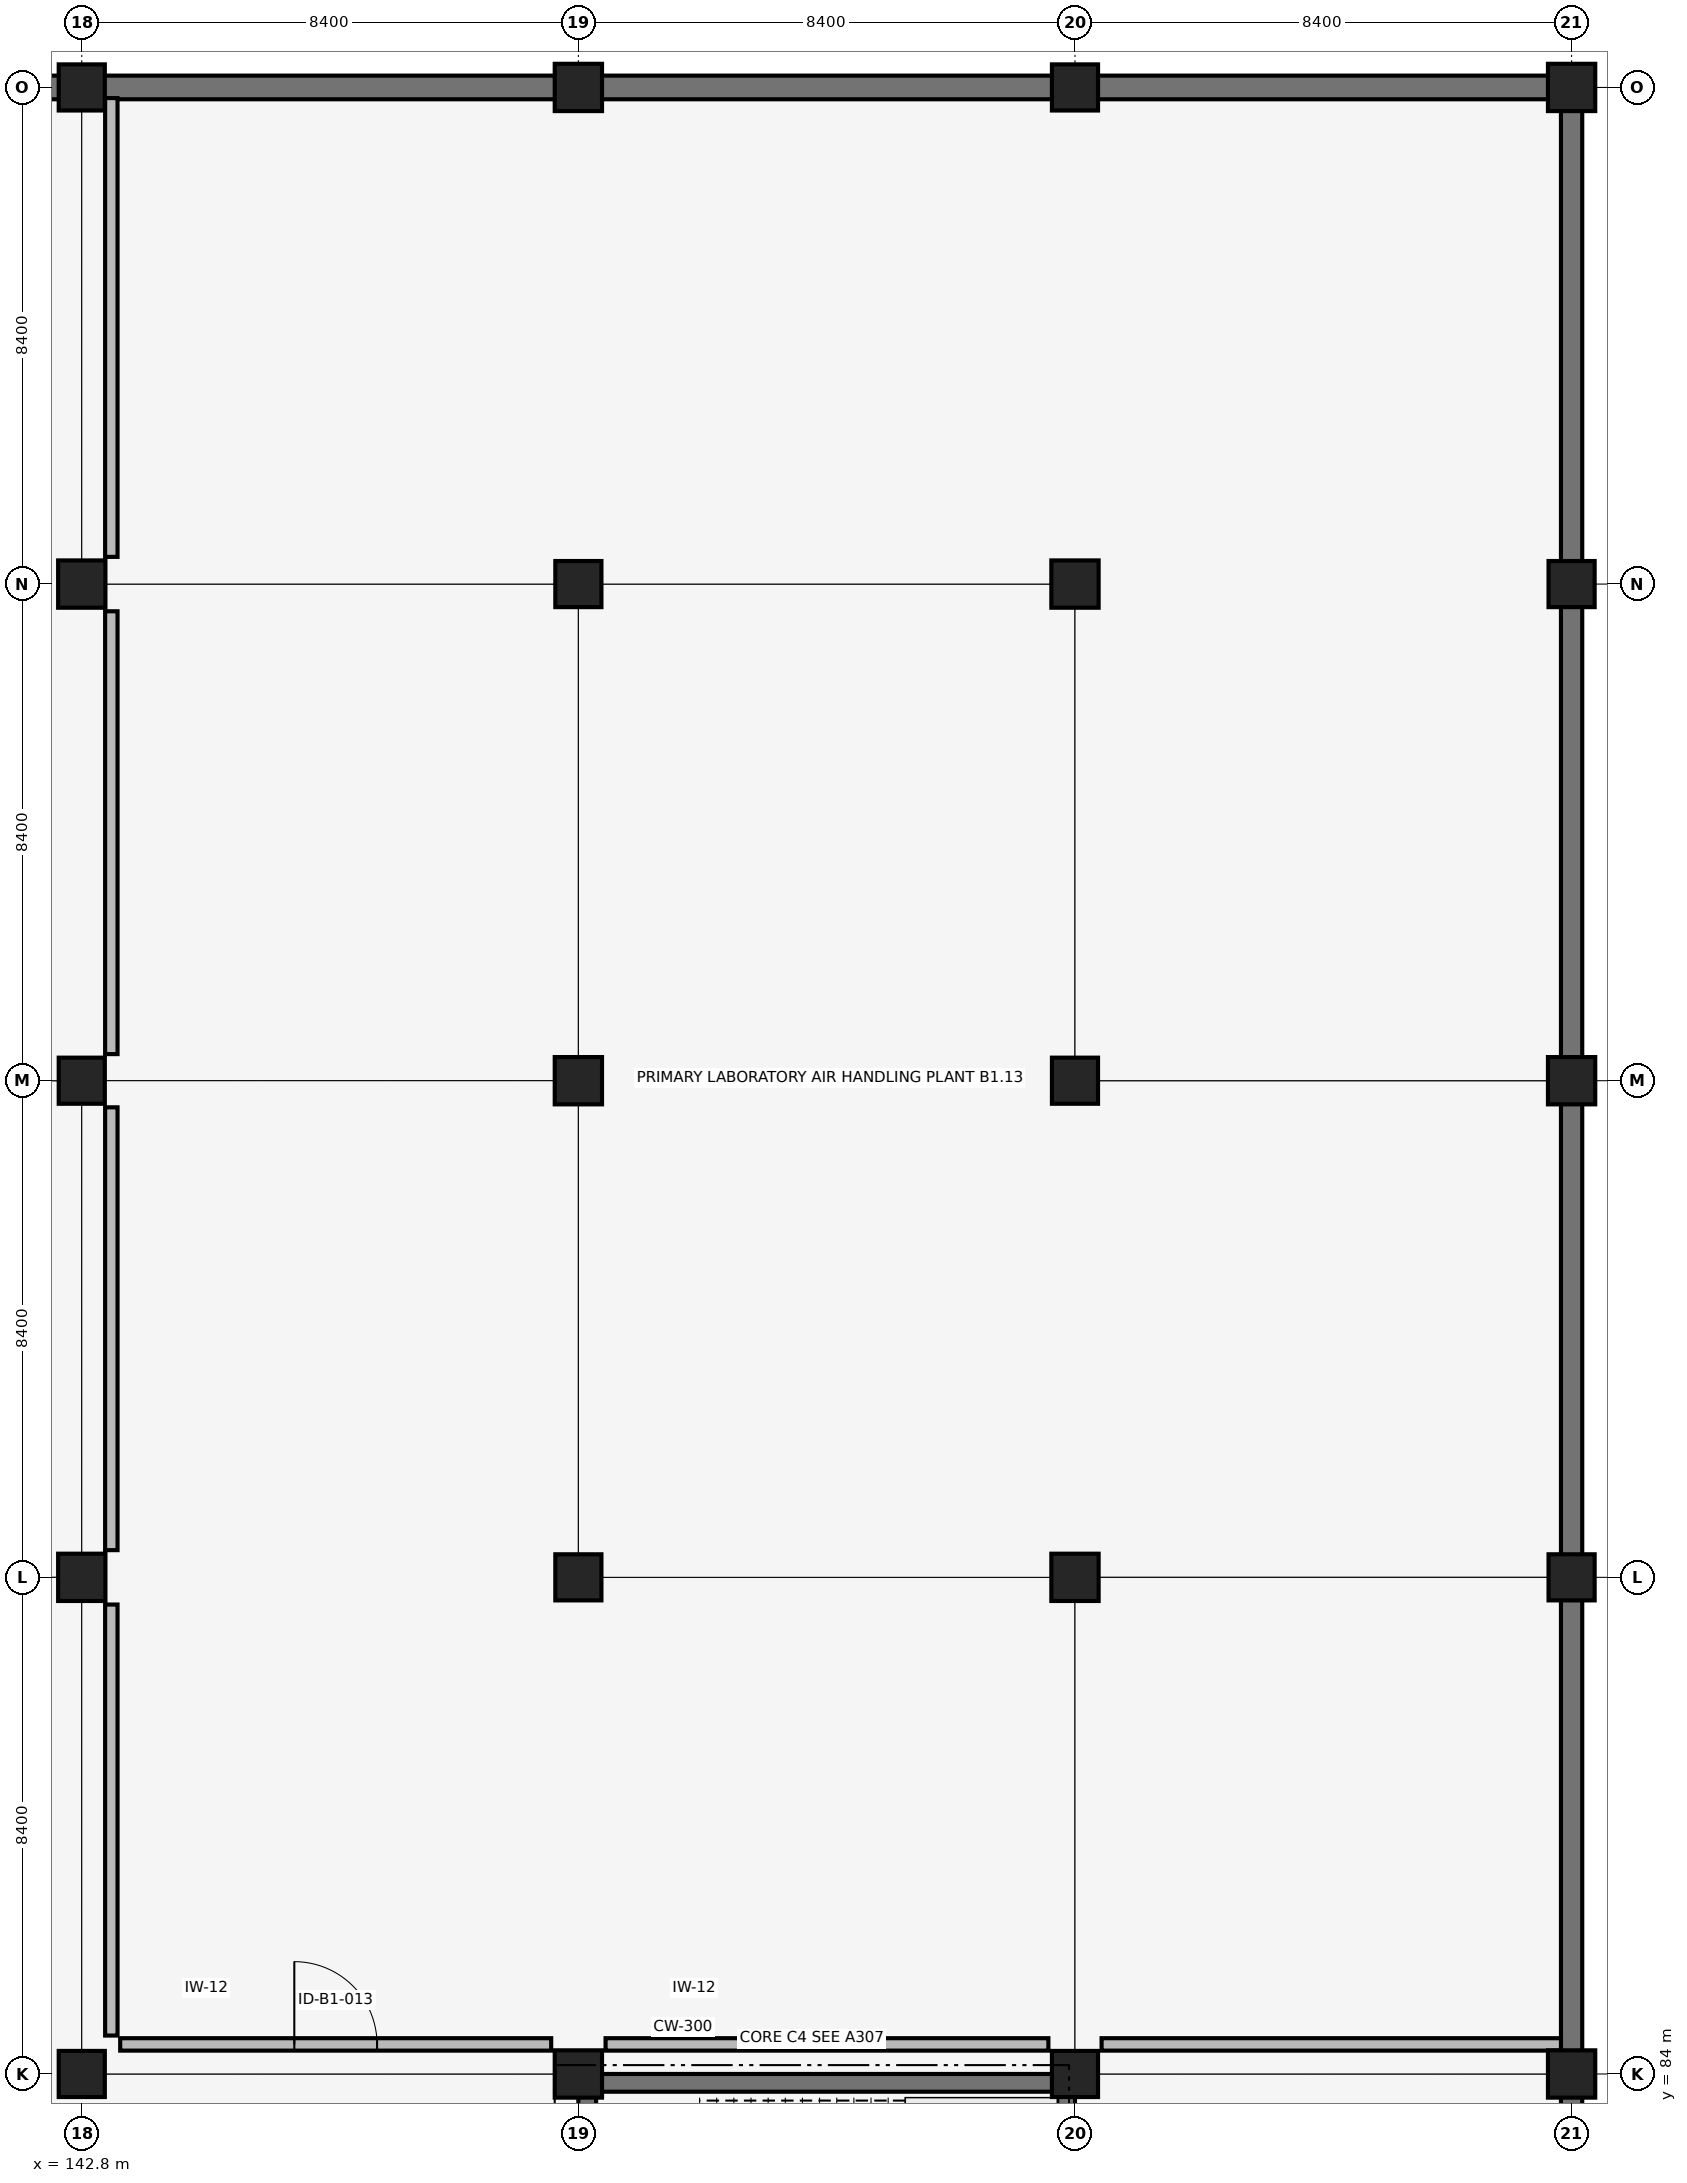
"""IFC4 building model, lengths in metres.
Left out: names, types, materials, properties, quantities, classifications, styles, units other than length and angle.
Written with IfcOpenShell. Run it as: python <this file> out.ifc"""

import sys

from ifc_helpers import new_model, si_unit, direction, frame, frame_2d, origin, origin_2d, place, context, subcontext, project, spatial, rectangle, extrude, element, fill, save


model = new_model("IFC4")
c1 = context("Model", 3, precision=1e-05, world=origin(), true_north=direction((0.0, 1.0)))
c2 = subcontext(c1, "Body", "Model", "MODEL_VIEW")
j1 = project(units=[si_unit("LENGTHUNIT", "METRE"), si_unit("PLANEANGLEUNIT", "RADIAN")], contexts=[c1])
p1 = place(None, origin())
s1 = spatial("IfcSite", under=j1, at=p1, CompositionType="ELEMENT")
p2 = place(p1, origin())
s2 = spatial("IfcBuilding", under=s1, at=p2, CompositionType="ELEMENT")
p3 = place(p2, frame((0.0, 0.0, -4.42)))
s3 = spatial("IfcBuildingStorey", under=s2, at=p3, CompositionType="ELEMENT", Elevation=-4.42)
p4 = place(p3, frame((134.75, 117.6, 0.0), z_axis=(0.0, 0.0, 1.0), x_axis=(1.0, 0.0, 0.0)))
e1 = element("IfcWall", 1, at=p4, inside=s3, PredefinedType="USERDEFINED", context=c2, shape_type="SweptSolid", body=[
    extrude(rectangle(XDim=7.7, YDim=0.4, at=frame_2d((3.85, 0.0))), origin(), (0.0, 0.0, 1.0), 4.12),
])
p5 = place(p3, frame((143.15, 117.6, 0.0), z_axis=(0.0, 0.0, 1.0), x_axis=(1.0, 0.0, 0.0)))
e2 = element("IfcWall", 2, at=p5, inside=s3, PredefinedType="USERDEFINED", context=c2, shape_type="SweptSolid", body=[
    extrude(rectangle(XDim=7.7, YDim=0.4, at=frame_2d((3.85, 0.0))), origin(), (0.0, 0.0, 1.0), 4.12),
])
p6 = place(p3, frame((151.55, 117.6, 0.0), z_axis=(0.0, 0.0, 1.0), x_axis=(1.0, 0.0, 0.0)))
e3 = element("IfcWall", 3, at=p6, inside=s3, PredefinedType="USERDEFINED", context=c2, shape_type="SweptSolid", body=[
    extrude(rectangle(XDim=7.7, YDim=0.4, at=frame_2d((3.85, 0.0))), origin(), (0.0, 0.0, 1.0), 4.12),
])
for number, where, z_axis, x_axis in (
    (4, (168.0, 75.95, 0.0), (0.0, 0.0, 1.0), (0.0, 1.0, 0.0)),
    (5, (168.0, 84.35, 0.0), (0.0, 0.0, 1.0), (0.0, 1.0, 0.0)),
    (6, (168.0, 92.75, 0.0), (0.0, 0.0, 1.0), (0.0, 1.0, 0.0)),
):
    element("IfcWall", number, at=place(p3, frame(where, z_axis=z_axis, x_axis=x_axis)), inside=s3, PredefinedType="USERDEFINED", context=c2, shape_type="SweptSolid", body=[
        extrude(rectangle(XDim=7.7, YDim=0.36, at=frame_2d((3.85, 0.0))), origin(), (0.0, 0.0, 1.0), 4.12),
    ])
p7 = place(p3, frame((168.0, 101.15, 0.0), z_axis=(0.0, 0.0, 1.0), x_axis=(0.0, 1.0, 0.0)))
e7 = element("IfcWall", 7, at=p7, inside=s3, PredefinedType="USERDEFINED", context=c2, shape_type="SweptSolid", body=[
    extrude(rectangle(XDim=7.7, YDim=0.36, at=frame_2d((3.85, 0.0))), origin(), (0.0, 0.0, 1.0), 4.12),
])
p8 = place(p3, frame((159.95, 117.6, 0.0), z_axis=(0.0, 0.0, 1.0), x_axis=(1.0, 0.0, 0.0)))
e8 = element("IfcWall", 8, at=p8, inside=s3, PredefinedType="USERDEFINED", context=c2, shape_type="SweptSolid", body=[
    extrude(rectangle(XDim=7.7, YDim=0.4, at=frame_2d((3.85, 0.0))), origin(), (0.0, 0.0, 1.0), 4.12),
])
p9 = place(p3, frame((168.0, 109.55, 0.0), z_axis=(0.0, 0.0, 1.0), x_axis=(0.0, 1.0, 0.0)))
e9 = element("IfcWall", 9, at=p9, inside=s3, PredefinedType="USERDEFINED", context=c2, shape_type="SweptSolid", body=[
    extrude(rectangle(XDim=7.7, YDim=0.36, at=frame_2d((3.85, 0.0))), origin(), (0.0, 0.0, 1.0), 4.12),
])
p10 = place(p3, frame((151.35, 83.85, 0.0), z_axis=(0.0, 0.0, 1.0), x_axis=(1.0, 0.0, 0.0)))
e10 = element("IfcWall", 10, at=p10, inside=s3, PredefinedType="SHEAR", context=c2, shape_type="SweptSolid", body=[
    extrude(rectangle(XDim=8.1, YDim=0.3, at=frame_2d((4.05, 0.0))), origin(), (0.0, 0.0, 1.0), 4.12),
])
p11 = place(p3, frame((151.35, 75.75, 0.0), z_axis=(0.0, 0.0, 1.0), x_axis=(0.0, 1.0, 0.0)))
e11 = element("IfcWall", 11, at=p11, inside=s3, PredefinedType="SHEAR", context=c2, shape_type="SweptSolid", body=[
    extrude(rectangle(XDim=8.1, YDim=0.3, at=frame_2d((4.05, 0.0))), origin(), (0.0, 0.0, 1.0), 4.12),
])
p12 = place(p11, frame((1.325, 0.0, 0.0)))
e12 = element("IfcOpeningElement", 12, at=p12, cuts=e11, PredefinedType="OPENING", context=c2, shape_type="SweptSolid", body=[
    extrude(rectangle(XDim=1.45, YDim=2.15, at=frame_2d((0.725, 1.075))), frame((0.0, 0.16, 0.0), z_axis=(0.0, -1.0, 0.0), x_axis=(1.0, 0.0, 0.0)), (0.0, 0.0, 1.0), 0.32),
])
p13 = place(p3, frame((159.45, 75.75, 0.0), z_axis=(0.0, 0.0, 1.0), x_axis=(0.0, 1.0, 0.0)))
e13 = element("IfcWall", 13, at=p13, inside=s3, PredefinedType="SHEAR", context=c2, shape_type="SweptSolid", body=[
    extrude(rectangle(XDim=8.1, YDim=0.3, at=frame_2d((4.05, 0.0))), origin(), (0.0, 0.0, 1.0), 4.12),
])
p14 = place(p3, frame((142.8, 84.0, -0.4), z_axis=(0.0, 0.0, 1.0), x_axis=(1.0, 0.0, 0.0)))
e14 = element("IfcColumn", 14, at=p14, inside=s3, PredefinedType="COLUMN", context=c2, shape_type="SweptSolid", body=[
    extrude(rectangle(XDim=0.78, YDim=0.78, at=origin_2d()), origin(), (0.0, 0.0, 1.0), 4.52),
])
p15 = place(p3, frame((142.8, 92.4, -0.4), z_axis=(0.0, 0.0, 1.0), x_axis=(1.0, 0.0, 0.0)))
e15 = element("IfcColumn", 15, at=p15, inside=s3, PredefinedType="COLUMN", context=c2, shape_type="SweptSolid", body=[
    extrude(rectangle(XDim=0.8, YDim=0.8, at=origin_2d()), origin(), (0.0, 0.0, 1.0), 4.52),
])
p16 = place(p3, frame((142.8, 100.8, -0.4), z_axis=(0.0, 0.0, 1.0), x_axis=(1.0, 0.0, 0.0)))
e16 = element("IfcColumn", 16, at=p16, inside=s3, PredefinedType="COLUMN", context=c2, shape_type="SweptSolid", body=[
    extrude(rectangle(XDim=0.78, YDim=0.78, at=origin_2d()), origin(), (0.0, 0.0, 1.0), 4.52),
])
p17 = place(p3, frame((142.8, 109.2, -0.4), z_axis=(0.0, 0.0, 1.0), x_axis=(1.0, 0.0, 0.0)))
e17 = element("IfcColumn", 17, at=p17, inside=s3, PredefinedType="COLUMN", context=c2, shape_type="SweptSolid", body=[
    extrude(rectangle(XDim=0.8, YDim=0.8, at=origin_2d()), origin(), (0.0, 0.0, 1.0), 4.52),
])
p18 = place(p3, frame((142.8, 117.6, -0.4), z_axis=(0.0, 0.0, 1.0), x_axis=(1.0, 0.0, 0.0)))
e18 = element("IfcColumn", 18, at=p18, inside=s3, PredefinedType="COLUMN", context=c2, shape_type="SweptSolid", body=[
    extrude(rectangle(XDim=0.78, YDim=0.78, at=origin_2d()), origin(), (0.0, 0.0, 1.0), 4.52),
])
p19 = place(p3, frame((151.2, 84.0, -0.4), z_axis=(0.0, 0.0, 1.0), x_axis=(1.0, 0.0, 0.0)))
e19 = element("IfcColumn", 19, at=p19, inside=s3, PredefinedType="COLUMN", context=c2, shape_type="SweptSolid", body=[
    extrude(rectangle(XDim=0.8, YDim=0.8, at=origin_2d()), origin(), (0.0, 0.0, 1.0), 4.52),
])
p20 = place(p3, frame((151.2, 92.4, -0.4), z_axis=(0.0, 0.0, 1.0), x_axis=(1.0, 0.0, 0.0)))
e20 = element("IfcColumn", 20, at=p20, inside=s3, PredefinedType="COLUMN", context=c2, shape_type="SweptSolid", body=[
    extrude(rectangle(XDim=0.78, YDim=0.78, at=origin_2d()), origin(), (0.0, 0.0, 1.0), 4.52),
])
p21 = place(p3, frame((151.2, 100.8, -0.4), z_axis=(0.0, 0.0, 1.0), x_axis=(1.0, 0.0, 0.0)))
e21 = element("IfcColumn", 21, at=p21, inside=s3, PredefinedType="COLUMN", context=c2, shape_type="SweptSolid", body=[
    extrude(rectangle(XDim=0.8, YDim=0.8, at=origin_2d()), origin(), (0.0, 0.0, 1.0), 4.52),
])
p22 = place(p3, frame((151.2, 109.2, -0.4), z_axis=(0.0, 0.0, 1.0), x_axis=(1.0, 0.0, 0.0)))
e22 = element("IfcColumn", 22, at=p22, inside=s3, PredefinedType="COLUMN", context=c2, shape_type="SweptSolid", body=[
    extrude(rectangle(XDim=0.78, YDim=0.78, at=origin_2d()), origin(), (0.0, 0.0, 1.0), 4.52),
])
p23 = place(p3, frame((151.2, 117.6, -0.4), z_axis=(0.0, 0.0, 1.0), x_axis=(1.0, 0.0, 0.0)))
e23 = element("IfcColumn", 23, at=p23, inside=s3, PredefinedType="COLUMN", context=c2, shape_type="SweptSolid", body=[
    extrude(rectangle(XDim=0.8, YDim=0.8, at=origin_2d()), origin(), (0.0, 0.0, 1.0), 4.52),
])
p24 = place(p3, frame((159.6, 84.0, -0.4), z_axis=(0.0, 0.0, 1.0), x_axis=(1.0, 0.0, 0.0)))
e24 = element("IfcColumn", 24, at=p24, inside=s3, PredefinedType="COLUMN", context=c2, shape_type="SweptSolid", body=[
    extrude(rectangle(XDim=0.78, YDim=0.78, at=origin_2d()), origin(), (0.0, 0.0, 1.0), 4.52),
])
p25 = place(p3, frame((159.6, 92.4, -0.4), z_axis=(0.0, 0.0, 1.0), x_axis=(1.0, 0.0, 0.0)))
e25 = element("IfcColumn", 25, at=p25, inside=s3, PredefinedType="COLUMN", context=c2, shape_type="SweptSolid", body=[
    extrude(rectangle(XDim=0.8, YDim=0.8, at=origin_2d()), origin(), (0.0, 0.0, 1.0), 4.52),
])
p26 = place(p3, frame((159.6, 100.8, -0.4), z_axis=(0.0, 0.0, 1.0), x_axis=(1.0, 0.0, 0.0)))
e26 = element("IfcColumn", 26, at=p26, inside=s3, PredefinedType="COLUMN", context=c2, shape_type="SweptSolid", body=[
    extrude(rectangle(XDim=0.78, YDim=0.78, at=origin_2d()), origin(), (0.0, 0.0, 1.0), 4.52),
])
p27 = place(p3, frame((159.6, 109.2, -0.4), z_axis=(0.0, 0.0, 1.0), x_axis=(1.0, 0.0, 0.0)))
e27 = element("IfcColumn", 27, at=p27, inside=s3, PredefinedType="COLUMN", context=c2, shape_type="SweptSolid", body=[
    extrude(rectangle(XDim=0.8, YDim=0.8, at=origin_2d()), origin(), (0.0, 0.0, 1.0), 4.52),
])
p28 = place(p3, frame((159.6, 117.6, -0.4), z_axis=(0.0, 0.0, 1.0), x_axis=(1.0, 0.0, 0.0)))
e28 = element("IfcColumn", 28, at=p28, inside=s3, PredefinedType="COLUMN", context=c2, shape_type="SweptSolid", body=[
    extrude(rectangle(XDim=0.78, YDim=0.78, at=origin_2d()), origin(), (0.0, 0.0, 1.0), 4.52),
])
p29 = place(p3, frame((168.0, 84.0, -0.4), z_axis=(0.0, 0.0, 1.0), x_axis=(1.0, 0.0, 0.0)))
e29 = element("IfcColumn", 29, at=p29, inside=s3, PredefinedType="COLUMN", context=c2, shape_type="SweptSolid", body=[
    extrude(rectangle(XDim=0.8, YDim=0.8, at=origin_2d()), origin(), (0.0, 0.0, 1.0), 4.52),
])
p30 = place(p3, frame((168.0, 92.4, -0.4), z_axis=(0.0, 0.0, 1.0), x_axis=(1.0, 0.0, 0.0)))
e30 = element("IfcColumn", 30, at=p30, inside=s3, PredefinedType="COLUMN", context=c2, shape_type="SweptSolid", body=[
    extrude(rectangle(XDim=0.78, YDim=0.78, at=origin_2d()), origin(), (0.0, 0.0, 1.0), 4.52),
])
p31 = place(p3, frame((168.0, 100.8, -0.4), z_axis=(0.0, 0.0, 1.0), x_axis=(1.0, 0.0, 0.0)))
e31 = element("IfcColumn", 31, at=p31, inside=s3, PredefinedType="COLUMN", context=c2, shape_type="SweptSolid", body=[
    extrude(rectangle(XDim=0.8, YDim=0.8, at=origin_2d()), origin(), (0.0, 0.0, 1.0), 4.52),
])
p32 = place(p3, frame((168.0, 109.2, -0.4), z_axis=(0.0, 0.0, 1.0), x_axis=(1.0, 0.0, 0.0)))
e32 = element("IfcColumn", 32, at=p32, inside=s3, PredefinedType="COLUMN", context=c2, shape_type="SweptSolid", body=[
    extrude(rectangle(XDim=0.78, YDim=0.78, at=origin_2d()), origin(), (0.0, 0.0, 1.0), 4.52),
])
p33 = place(p3, frame((168.0, 117.6, -0.4), z_axis=(0.0, 0.0, 1.0), x_axis=(1.0, 0.0, 0.0)))
e33 = element("IfcColumn", 33, at=p33, inside=s3, PredefinedType="COLUMN", context=c2, shape_type="SweptSolid", body=[
    extrude(rectangle(XDim=0.8, YDim=0.8, at=origin_2d()), origin(), (0.0, 0.0, 1.0), 4.52),
])
p34 = place(p3, frame((143.45, 84.5, 0.0), z_axis=(0.0, 0.0, 1.0), x_axis=(1.0, 0.0, 0.0)))
e34 = element("IfcWall", 34, at=p34, inside=s3, PredefinedType="PARTITIONING", context=c2, shape_type="SweptSolid", body=[
    extrude(rectangle(XDim=7.29, YDim=0.21, at=frame_2d((3.645, 0.0))), origin(), (0.0, 0.0, 1.0), 4.12),
])
p35 = place(p34, frame((2.945, 0.0, 0.0)))
e35 = element("IfcOpeningElement", 35, at=p35, cuts=e34, PredefinedType="OPENING", context=c2, shape_type="SweptSolid", body=[
    extrude(rectangle(XDim=1.4, YDim=2.2, at=frame_2d((0.7, 1.1))), frame((0.0, 0.115, 0.0), z_axis=(0.0, -1.0, 0.0), x_axis=(1.0, 0.0, 0.0)), (0.0, 0.0, 1.0), 0.23),
])
p36 = place(p3, frame((151.66, 84.5, 0.0), z_axis=(0.0, 0.0, 1.0), x_axis=(1.0, 0.0, 0.0)))
e36 = element("IfcWall", 36, at=p36, inside=s3, PredefinedType="PARTITIONING", context=c2, shape_type="SweptSolid", body=[
    extrude(rectangle(XDim=7.49, YDim=0.21, at=frame_2d((3.745, 0.0))), origin(), (0.0, 0.0, 1.0), 4.12),
])
p37 = place(p3, frame((160.05, 84.5, 0.0), z_axis=(0.0, 0.0, 1.0), x_axis=(1.0, 0.0, 0.0)))
e37 = element("IfcWall", 37, at=p37, inside=s3, PredefinedType="PARTITIONING", context=c2, shape_type="SweptSolid", body=[
    extrude(rectangle(XDim=7.77, YDim=0.21, at=frame_2d((3.885, 0.0))), origin(), (0.0, 0.0, 1.0), 3.37),
])
p38 = place(p3, frame((143.3, 84.65, 0.0), z_axis=(0.0, 0.0, 1.0), x_axis=(0.0, 1.0, 0.0)))
e38 = element("IfcWall", 38, at=p38, inside=s3, PredefinedType="PARTITIONING", context=c2, shape_type="SweptSolid", body=[
    extrude(rectangle(XDim=7.29, YDim=0.21, at=frame_2d((3.645, 0.0))), origin(), (0.0, 0.0, 1.0), 3.56),
])
p39 = place(p3, frame((143.3, 92.86, 0.0), z_axis=(0.0, 0.0, 1.0), x_axis=(0.0, 1.0, 0.0)))
e39 = element("IfcWall", 39, at=p39, inside=s3, PredefinedType="PARTITIONING", context=c2, shape_type="SweptSolid", body=[
    extrude(rectangle(XDim=7.49, YDim=0.21, at=frame_2d((3.745, 0.0))), origin(), (0.0, 0.0, 1.0), 3.57),
])
p40 = place(p3, frame((143.3, 101.25, 0.0), z_axis=(0.0, 0.0, 1.0), x_axis=(0.0, 1.0, 0.0)))
e40 = element("IfcWall", 40, at=p40, inside=s3, PredefinedType="PARTITIONING", context=c2, shape_type="SweptSolid", body=[
    extrude(rectangle(XDim=7.49, YDim=0.21, at=frame_2d((3.745, 0.0))), origin(), (0.0, 0.0, 1.0), 3.56),
])
p41 = place(p3, frame((143.3, 109.66, 0.0), z_axis=(0.0, 0.0, 1.0), x_axis=(0.0, 1.0, 0.0)))
e41 = element("IfcWall", 41, at=p41, inside=s3, PredefinedType="PARTITIONING", context=c2, shape_type="SweptSolid", body=[
    extrude(rectangle(XDim=7.76, YDim=0.21, at=frame_2d((3.88, 0.0))), origin(), (0.0, 0.0, 1.0), 3.38),
])
p42 = place(p35, origin())
e42 = element("IfcDoor", 42, at=p42, inside=s3, OperationType="DOUBLE_DOOR_SINGLE_SWING", PredefinedType="DOOR", context=c2, shape_type="SweptSolid", body=[
    extrude(rectangle(XDim=1.4, YDim=2.2, at=frame_2d((0.7, 1.1))), frame((0.0, 0.025, 0.0), z_axis=(0.0, -1.0, 0.0), x_axis=(1.0, 0.0, 0.0)), (0.0, 0.0, 1.0), 0.05),
])
fill(e35, e42)
save(model, sys.argv[1])
